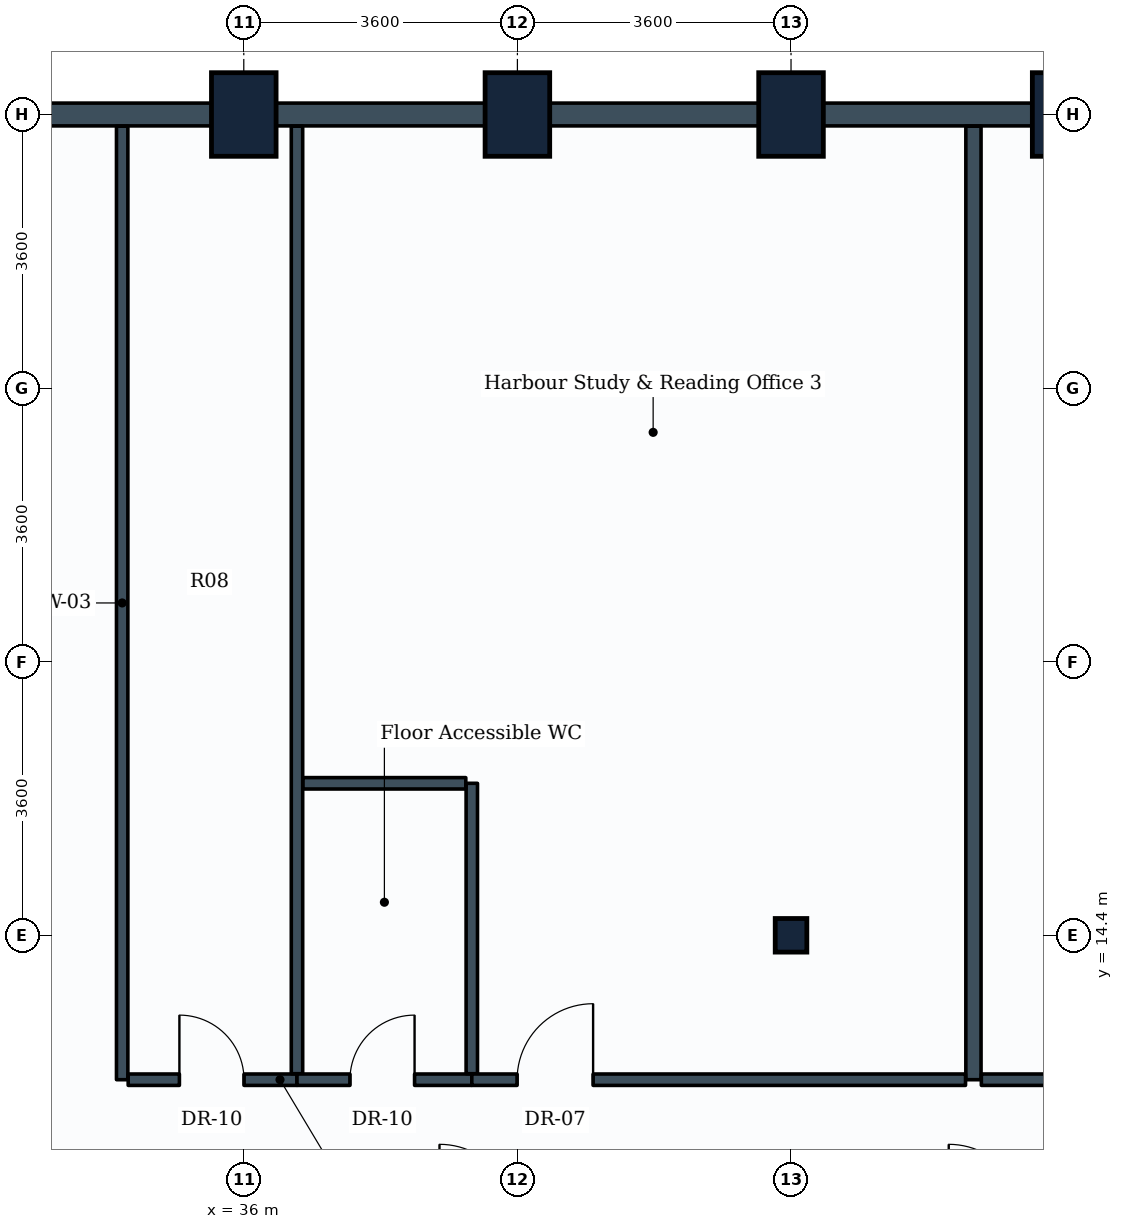
"""IFC4 building model, lengths in metres.
Left out: names, types, materials, properties, quantities, classifications, styles, units other than length and angle.
Written with IfcOpenShell. Run it as: python <this file> out.ifc"""

import sys

from ifc_helpers import new_model, si_unit, direction, frame, frame_2d, origin, origin_2d, place, context, subcontext, project, spatial, rectangle, i_section, extrude, element, fill, save


model = new_model("IFC4")
c1 = context("Model", 3, precision=1e-05, world=origin(), true_north=direction((0.0, 1.0)))
c2 = subcontext(c1, "Body", "Model", "MODEL_VIEW")
j1 = project(units=[si_unit("LENGTHUNIT", "METRE"), si_unit("PLANEANGLEUNIT", "RADIAN")], contexts=[c1])
p1 = place(None, origin())
s1 = spatial("IfcSite", under=j1, at=p1, CompositionType="ELEMENT")
p2 = place(p1, origin())
s2 = spatial("IfcBuilding", under=s1, at=p2, CompositionType="ELEMENT")
p3 = place(p2, frame((0.0, 0.0, 123.8)))
s3 = spatial("IfcBuildingStorey", under=s2, at=p3, CompositionType="ELEMENT", Elevation=123.8)
for number, where, z_axis, x_axis in (
    (1, (36.0, 25.2, 0.0), (0.0, 0.0, 1.0), (1.0, 0.0, 0.0)),
    (2, (39.6, 25.2, 0.0), (0.0, 0.0, 1.0), (1.0, 0.0, 0.0)),
):
    element("IfcColumn", number, at=place(p3, frame(where, z_axis=z_axis, x_axis=x_axis)), inside=s3, PredefinedType="COLUMN", context=c2, shape_type="SweptSolid", body=[
        extrude(rectangle(XDim=0.85, YDim=1.1, at=origin_2d()), origin(), (0.0, 0.0, 1.0), 3.8),
    ])
p4 = place(p3, frame((43.2, 14.4, 0.0), z_axis=(0.0, 0.0, 1.0), x_axis=(1.0, 0.0, 0.0)))
e3 = element("IfcColumn", 3, at=p4, inside=s3, PredefinedType="COLUMN", context=c2, shape_type="SweptSolid", body=[
    extrude(i_section(OverallWidth=0.416, OverallDepth=0.442, WebThickness=0.025, FlangeThickness=0.041, FilletRadius=0.015, at=origin_2d()), origin(), (0.0, 0.0, 1.0), 3.8),
])
for number, where, z_axis, x_axis in (
    (4, (43.2, 25.2, 0.0), (0.0, 0.0, 1.0), (1.0, 0.0, 0.0)),
    (5, (46.8, 25.2, 0.0), (0.0, 0.0, 1.0), (1.0, 0.0, 0.0)),
):
    element("IfcColumn", number, at=place(p3, frame(where, z_axis=z_axis, x_axis=x_axis)), inside=s3, PredefinedType="COLUMN", context=c2, shape_type="SweptSolid", body=[
        extrude(rectangle(XDim=0.85, YDim=1.1, at=origin_2d()), origin(), (0.0, 0.0, 1.0), 3.8),
    ])
p5 = place(p3, frame((43.2, 25.2, 0.0), z_axis=(0.0, 0.0, 1.0), x_axis=(1.0, 0.0, 0.0)))
e6 = element("IfcWall", 6, at=p5, inside=s3, PredefinedType="STANDARD", context=c2, shape_type="SweptSolid", body=[
    extrude(rectangle(XDim=3.6, YDim=0.3, at=frame_2d((1.8, 0.0))), origin(), (0.0, 0.0, 1.0), 2.93),
])
p6 = place(p3, frame((39.6, 25.2, 0.0), z_axis=(0.0, 0.0, 1.0), x_axis=(1.0, 0.0, 0.0)))
e7 = element("IfcWall", 7, at=p6, inside=s3, PredefinedType="STANDARD", context=c2, shape_type="SweptSolid", body=[
    extrude(rectangle(XDim=3.6, YDim=0.3, at=frame_2d((1.8, 0.0))), origin(), (0.0, 0.0, 1.0), 2.93),
])
for number, where, z_axis, x_axis in (
    (8, (36.0, 25.2, 0.0), (0.0, 0.0, 1.0), (1.0, 0.0, 0.0)),
    (9, (32.4, 25.2, 0.0), (0.0, 0.0, 1.0), (1.0, 0.0, 0.0)),
):
    element("IfcWall", number, at=place(p3, frame(where, z_axis=z_axis, x_axis=x_axis)), inside=s3, PredefinedType="STANDARD", context=c2, shape_type="SweptSolid", body=[
        extrude(rectangle(XDim=3.6, YDim=0.3, at=frame_2d((1.8, 0.0))), origin(), (0.0, 0.0, 1.0), 2.93),
    ])
p7 = place(p3, frame((34.4, 12.5, 0.0), z_axis=(0.0, 0.0, 1.0), x_axis=(0.0, 1.0, 0.0)))
e10 = element("IfcWall", 10, at=p7, inside=s3, PredefinedType="PARTITIONING", context=c2, shape_type="SweptSolid", body=[
    extrude(rectangle(XDim=12.546, YDim=0.15, at=frame_2d((6.273, 0.0))), origin(), (0.0, 0.0, 1.0), 2.43),
])
p8 = place(p3, frame((34.479, 12.5, 0.0), z_axis=(0.0, 0.0, 1.0), x_axis=(1.0, 0.0, 0.0)))
e11 = element("IfcWall", 11, at=p8, inside=s3, PredefinedType="PARTITIONING", context=c2, shape_type="SweptSolid", body=[
    extrude(rectangle(XDim=2.221, YDim=0.15, at=frame_2d((1.11, 0.0))), origin(), (0.0, 0.0, 1.0), 3.1),
])
p9 = place(p8, frame((0.674, 0.0, 0.0)))
e12 = element("IfcOpeningElement", 12, at=p9, cuts=e11, PredefinedType="OPENING", context=c2, shape_type="SweptSolid", body=[
    extrude(rectangle(XDim=0.85, YDim=2.1, at=frame_2d((0.425, 1.05))), frame((0.0, 0.085, 0.0), z_axis=(0.0, -1.0, 0.0), x_axis=(1.0, 0.0, 0.0)), (0.0, 0.0, 1.0), 0.17),
])
p10 = place(p3, frame((36.7, 12.579, 0.0), z_axis=(0.0, 0.0, 1.0), x_axis=(0.0, 1.0, 0.0)))
e13 = element("IfcWall", 13, at=p10, inside=s3, PredefinedType="PARTITIONING", context=c2, shape_type="SweptSolid", body=[
    extrude(rectangle(XDim=12.467, YDim=0.15, at=frame_2d((6.233, 0.0))), origin(), (0.0, 0.0, 1.0), 2.43),
])
p11 = place(p3, frame((36.7, 12.5, 0.0), z_axis=(0.0, 0.0, 1.0), x_axis=(1.0, 0.0, 0.0)))
e14 = element("IfcWall", 14, at=p11, inside=s3, PredefinedType="PARTITIONING", context=c2, shape_type="SweptSolid", body=[
    extrude(rectangle(XDim=2.3, YDim=0.15, at=frame_2d((1.15, 0.0))), origin(), (0.0, 0.0, 1.0), 3.465),
])
p12 = place(p11, frame((0.697, 0.0, 0.0)))
e15 = element("IfcOpeningElement", 15, at=p12, cuts=e14, PredefinedType="OPENING", context=c2, shape_type="SweptSolid", body=[
    extrude(rectangle(XDim=0.85, YDim=2.1, at=frame_2d((0.425, 1.05))), frame((0.0, 0.085, 0.0), z_axis=(0.0, -1.0, 0.0), x_axis=(1.0, 0.0, 0.0)), (0.0, 0.0, 1.0), 0.17),
])
p13 = place(p3, frame((39.0, 12.579, 0.0), z_axis=(0.0, 0.0, 1.0), x_axis=(0.0, 1.0, 0.0)))
e16 = element("IfcWall", 16, at=p13, inside=s3, PredefinedType="PARTITIONING", context=c2, shape_type="SweptSolid", body=[
    extrude(rectangle(XDim=3.821, YDim=0.15, at=frame_2d((1.91, 0.0))), origin(), (0.0, 0.0, 1.0), 2.43),
])
p14 = place(p3, frame((36.779, 16.4, 0.0), z_axis=(0.0, 0.0, 1.0), x_axis=(1.0, 0.0, 0.0)))
e17 = element("IfcWall", 17, at=p14, inside=s3, PredefinedType="PARTITIONING", context=c2, shape_type="SweptSolid", body=[
    extrude(rectangle(XDim=2.142, YDim=0.15, at=frame_2d((1.071, 0.0))), origin(), (0.0, 0.0, 1.0), 3.465),
])
p15 = place(p3, frame((45.6, 12.5, 0.0), z_axis=(0.0, 0.0, 1.0), x_axis=(0.0, 1.0, 0.0)))
e18 = element("IfcWall", 18, at=p15, inside=s3, PredefinedType="PARTITIONING", context=c2, shape_type="SweptSolid", body=[
    extrude(rectangle(XDim=12.546, YDim=0.2, at=frame_2d((6.273, 0.0))), origin(), (0.0, 0.0, 1.0), 2.43),
])
p16 = place(p3, frame((39.0, 12.5, 0.0), z_axis=(0.0, 0.0, 1.0), x_axis=(1.0, 0.0, 0.0)))
e19 = element("IfcWall", 19, at=p16, inside=s3, PredefinedType="PARTITIONING", context=c2, shape_type="SweptSolid", body=[
    extrude(rectangle(XDim=6.496, YDim=0.15, at=frame_2d((3.248, 0.0))), origin(), (0.0, 0.0, 1.0), 3.11),
])
p17 = place(p16, frame((0.596, 0.0, 0.0)))
e20 = element("IfcOpeningElement", 20, at=p17, cuts=e19, PredefinedType="OPENING", context=c2, shape_type="SweptSolid", body=[
    extrude(rectangle(XDim=1.0, YDim=2.1, at=frame_2d((0.5, 1.05))), frame((0.0, 0.085, 0.0), z_axis=(0.0, -1.0, 0.0), x_axis=(1.0, 0.0, 0.0)), (0.0, 0.0, 1.0), 0.17),
])
p18 = place(p3, frame((45.704, 12.5, 0.0), z_axis=(0.0, 0.0, 1.0), x_axis=(1.0, 0.0, 0.0)))
e21 = element("IfcWall", 21, at=p18, inside=s3, PredefinedType="PARTITIONING", context=c2, shape_type="SweptSolid", body=[
    extrude(rectangle(XDim=6.496, YDim=0.15, at=frame_2d((3.248, 0.0))), origin(), (0.0, 0.0, 1.0), 3.11),
])
p19 = place(p18, frame((1.122, 0.0, 0.0)))
e22 = element("IfcOpeningElement", 22, at=p19, cuts=e21, PredefinedType="OPENING", context=c2, shape_type="SweptSolid", body=[
    extrude(rectangle(XDim=1.0, YDim=2.1, at=frame_2d((0.5, 1.05))), frame((0.0, 0.085, 0.0), z_axis=(0.0, -1.0, 0.0), x_axis=(1.0, 0.0, 0.0)), (0.0, 0.0, 1.0), 0.17),
])
p20 = place(p9, origin())
e23 = element("IfcDoor", 23, at=p20, inside=s3, OperationType="SINGLE_SWING_LEFT", PredefinedType="DOOR", context=c2, shape_type="SweptSolid", body=[
    extrude(rectangle(XDim=0.85, YDim=2.1, at=frame_2d((0.425, 1.05))), frame((0.0, 0.025, 0.0), z_axis=(0.0, -1.0, 0.0), x_axis=(1.0, 0.0, 0.0)), (0.0, 0.0, 1.0), 0.05),
])
fill(e12, e23)
p21 = place(p12, origin())
e24 = element("IfcDoor", 24, at=p21, inside=s3, OperationType="SINGLE_SWING_RIGHT", PredefinedType="DOOR", context=c2, shape_type="SweptSolid", body=[
    extrude(rectangle(XDim=0.85, YDim=2.1, at=frame_2d((0.425, 1.05))), frame((0.0, 0.025, 0.0), z_axis=(0.0, -1.0, 0.0), x_axis=(1.0, 0.0, 0.0)), (0.0, 0.0, 1.0), 0.05),
])
fill(e15, e24)
p22 = place(p17, origin())
e25 = element("IfcDoor", 25, at=p22, inside=s3, OperationType="SINGLE_SWING_RIGHT", PredefinedType="DOOR", context=c2, shape_type="SweptSolid", body=[
    extrude(rectangle(XDim=1.0, YDim=2.1, at=frame_2d((0.5, 1.05))), frame((0.0, 0.025, 0.0), z_axis=(0.0, -1.0, 0.0), x_axis=(1.0, 0.0, 0.0)), (0.0, 0.0, 1.0), 0.05),
])
fill(e20, e25)
save(model, sys.argv[1])
